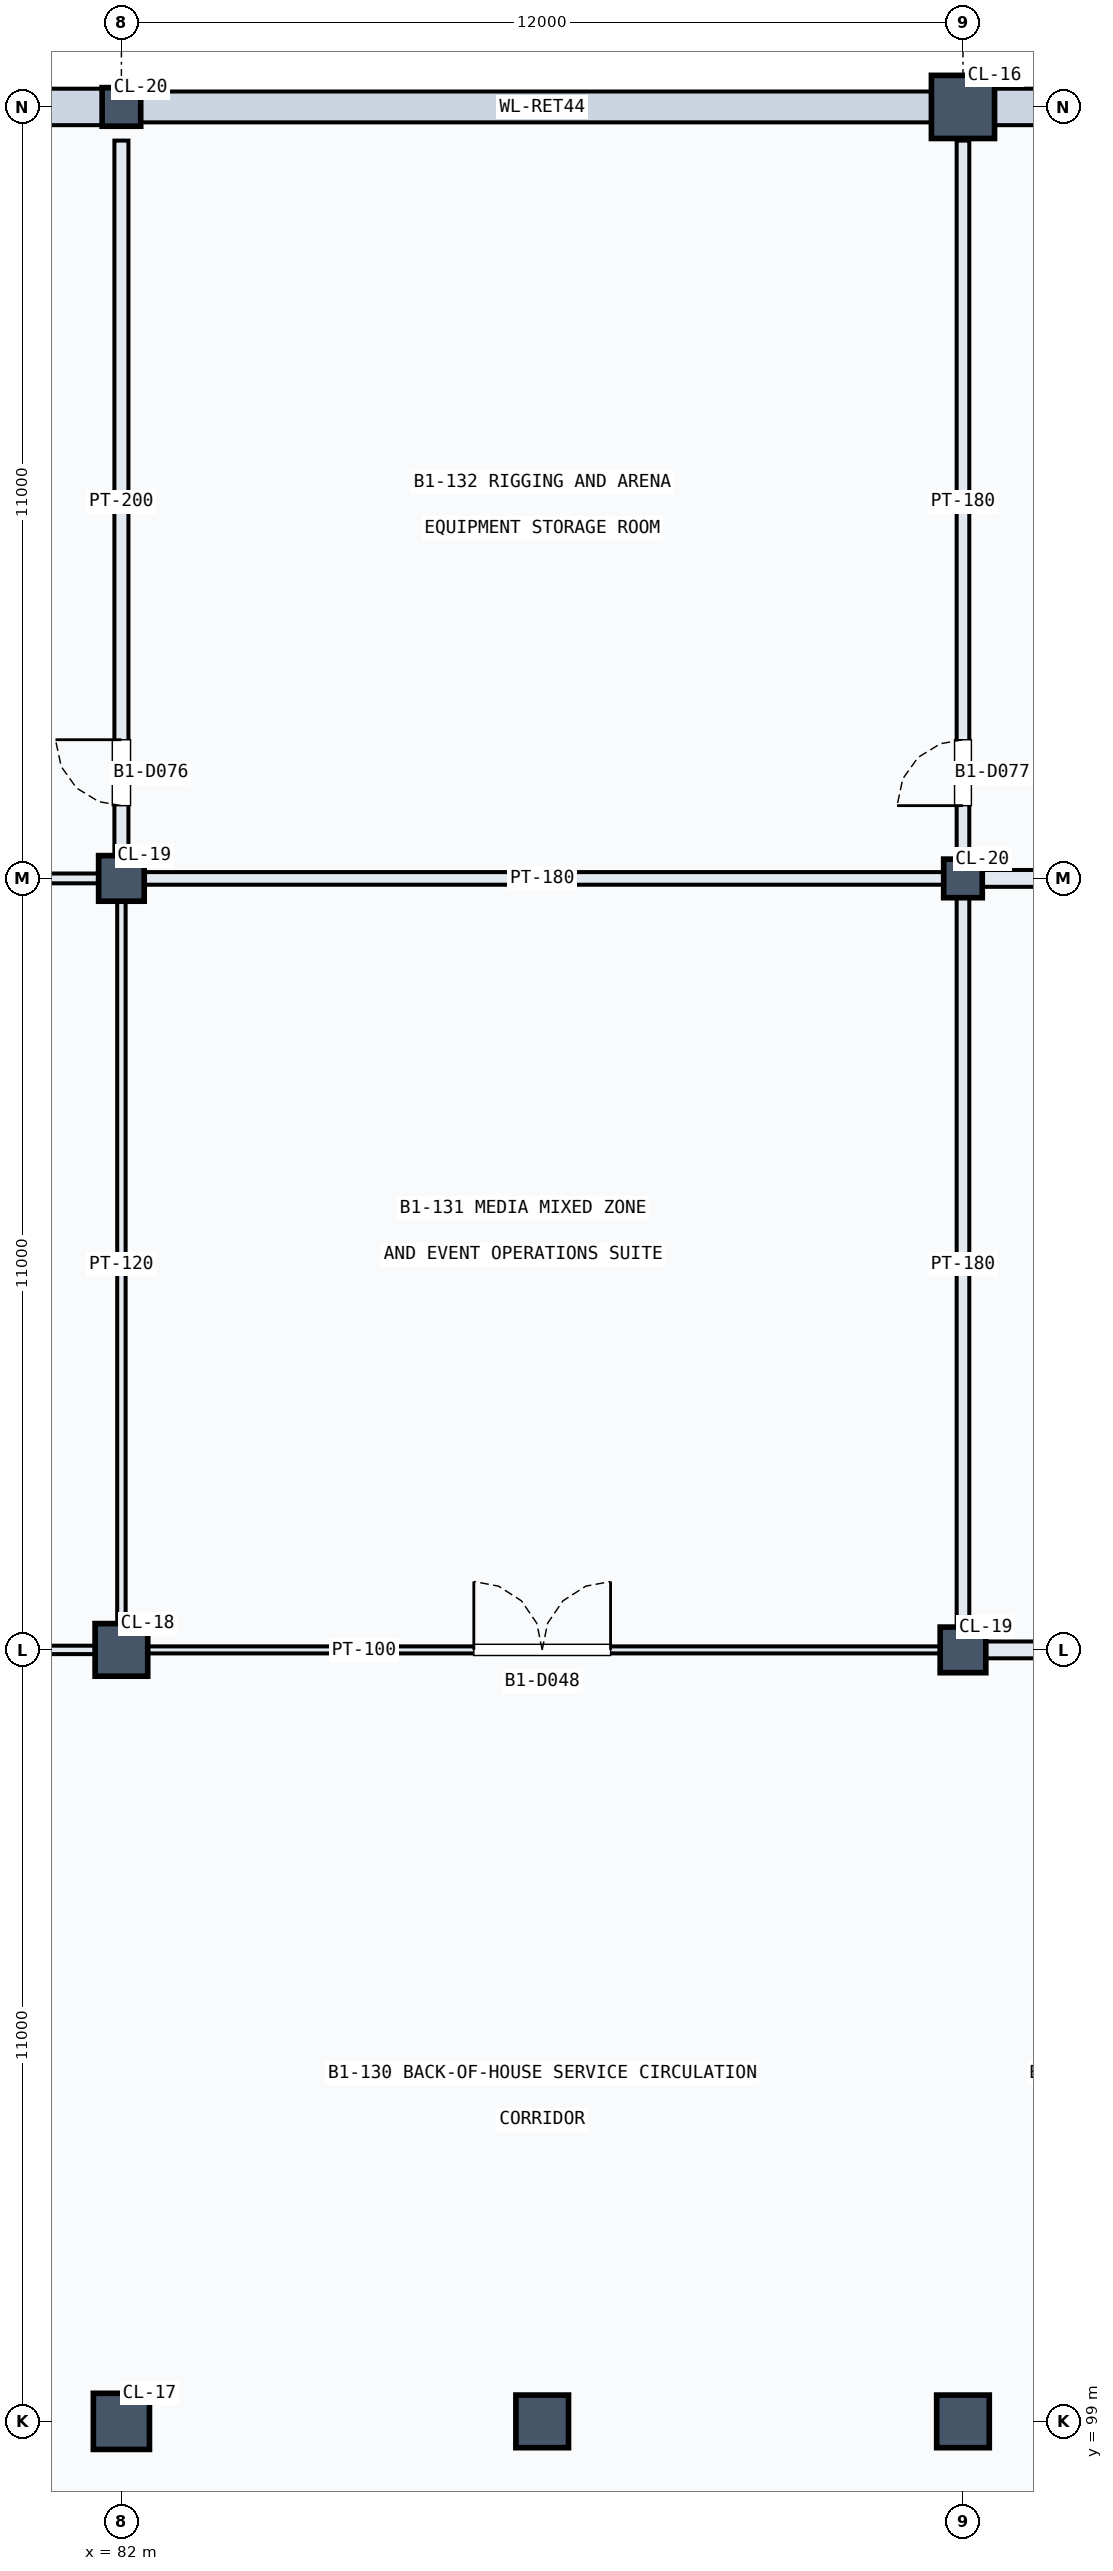
"""IFC4 building model, lengths in metres.
Left out: names, types, materials, properties, quantities, classifications, styles, units other than length and angle.
Written with IfcOpenShell. Run it as: python <this file> out.ifc"""

import sys

from ifc_helpers import new_model, si_unit, direction, frame, frame_2d, origin, origin_2d, place, context, subcontext, project, spatial, rectangle, circle, extrude, element, fill, save


model = new_model("IFC4")
c1 = context("Model", 3, precision=1e-05, world=origin(), true_north=direction((0.0, 1.0)))
c2 = subcontext(c1, "Body", "Model", "MODEL_VIEW")
j1 = project(units=[si_unit("LENGTHUNIT", "METRE"), si_unit("PLANEANGLEUNIT", "RADIAN")], contexts=[c1])
p1 = place(None, origin())
s1 = spatial("IfcSite", under=j1, at=p1, CompositionType="ELEMENT")
p2 = place(p1, origin())
s2 = spatial("IfcBuilding", under=s1, at=p2, CompositionType="ELEMENT")
p3 = place(p2, frame((0.0, 0.0, -5.4)))
s3 = spatial("IfcBuildingStorey", under=s2, at=p3, CompositionType="ELEMENT", Elevation=-5.4)
p4 = place(p3, frame((82.0, 99.0, 0.0), z_axis=(0.0, 0.0, 1.0), x_axis=(1.0, 0.0, 0.0)))
e1 = element("IfcColumn", 1, at=p4, inside=s3, PredefinedType="COLUMN", context=c2, shape_type="SweptSolid", body=[
    extrude(circle(Radius=0.4, at=origin_2d()), origin(), (0.0, 0.0, 1.0), 5.4),
])
p5 = place(p3, frame((82.0, 110.0, 0.0), z_axis=(0.0, 0.0, 1.0), x_axis=(1.0, 0.0, 0.0)))
e2 = element("IfcColumn", 2, at=p5, inside=s3, PredefinedType="COLUMN", context=c2, shape_type="SweptSolid", body=[
    extrude(circle(Radius=0.375, at=origin_2d()), origin(), (0.0, 0.0, 1.0), 5.4),
])
p6 = place(p3, frame((82.0, 121.0, 0.0), z_axis=(0.0, 0.0, 1.0), x_axis=(1.0, 0.0, 0.0)))
e3 = element("IfcColumn", 3, at=p6, inside=s3, PredefinedType="COLUMN", context=c2, shape_type="SweptSolid", body=[
    extrude(circle(Radius=0.325, at=origin_2d()), origin(), (0.0, 0.0, 1.0), 5.4),
])
p7 = place(p3, frame((82.0, 132.0, 0.0), z_axis=(0.0, 0.0, 1.0), x_axis=(1.0, 0.0, 0.0)))
e4 = element("IfcColumn", 4, at=p7, inside=s3, PredefinedType="COLUMN", context=c2, shape_type="SweptSolid", body=[
    extrude(circle(Radius=0.275, at=origin_2d()), origin(), (0.0, 0.0, 1.0), 5.4),
])
p8 = place(p3, frame((94.0, 99.0, 0.0), z_axis=(0.0, 0.0, 1.0), x_axis=(1.0, 0.0, 0.0)))
e5 = element("IfcColumn", 5, at=p8, inside=s3, PredefinedType="COLUMN", context=c2, shape_type="SweptSolid", body=[
    extrude(circle(Radius=0.375, at=origin_2d()), origin(), (0.0, 0.0, 1.0), 5.4),
])
p9 = place(p3, frame((94.0, 110.0, 0.0), z_axis=(0.0, 0.0, 1.0), x_axis=(1.0, 0.0, 0.0)))
e6 = element("IfcColumn", 6, at=p9, inside=s3, PredefinedType="COLUMN", context=c2, shape_type="SweptSolid", body=[
    extrude(circle(Radius=0.325, at=origin_2d()), origin(), (0.0, 0.0, 1.0), 5.4),
])
p10 = place(p3, frame((94.0, 121.0, 0.0), z_axis=(0.0, 0.0, 1.0), x_axis=(1.0, 0.0, 0.0)))
e7 = element("IfcColumn", 7, at=p10, inside=s3, PredefinedType="COLUMN", context=c2, shape_type="SweptSolid", body=[
    extrude(circle(Radius=0.275, at=origin_2d()), origin(), (0.0, 0.0, 1.0), 5.4),
])
p11 = place(p3, frame((94.0, 132.0, 0.0), z_axis=(0.0, 0.0, 1.0), x_axis=(1.0, 0.0, 0.0)))
e8 = element("IfcColumn", 8, at=p11, inside=s3, PredefinedType="COLUMN", context=c2, shape_type="SweptSolid", body=[
    extrude(circle(Radius=0.45, at=origin_2d()), origin(), (0.0, 0.0, 1.0), 5.4),
])
p12 = place(p3, frame((88.0, 99.0, 0.0), z_axis=(0.0, 0.0, 1.0), x_axis=(1.0, 0.0, 0.0)))
e9 = element("IfcColumn", 9, at=p12, inside=s3, PredefinedType="COLUMN", context=c2, shape_type="SweptSolid", body=[
    extrude(circle(Radius=0.375, at=origin_2d()), origin(), (0.0, 0.0, 1.0), 5.4),
])
p13 = place(p3, frame((70.22, 132.0, 0.0), z_axis=(0.0, 0.0, 1.0), x_axis=(1.0, 0.0, 0.0)))
e10 = element("IfcWall", 10, at=p13, inside=s3, PredefinedType="SOLIDWALL", context=c2, shape_type="SweptSolid", body=[
    extrude(rectangle(XDim=11.56, YDim=0.52, at=frame_2d((5.78, 0.0))), origin(), (0.0, 0.0, 1.0), 4.418),
])
p14 = place(p3, frame((82.22, 132.0, 0.0), z_axis=(0.0, 0.0, 1.0), x_axis=(1.0, 0.0, 0.0)))
e11 = element("IfcWall", 11, at=p14, inside=s3, PredefinedType="SOLIDWALL", context=c2, shape_type="SweptSolid", body=[
    extrude(rectangle(XDim=11.56, YDim=0.44, at=frame_2d((5.78, 0.0))), origin(), (0.0, 0.0, 1.0), 4.418),
])
p15 = place(p3, frame((94.22, 132.0, 0.0), z_axis=(0.0, 0.0, 1.0), x_axis=(1.0, 0.0, 0.0)))
e12 = element("IfcWall", 12, at=p15, inside=s3, PredefinedType="SOLIDWALL", context=c2, shape_type="SweptSolid", body=[
    extrude(rectangle(XDim=9.56, YDim=0.52, at=frame_2d((4.78, 0.0))), origin(), (0.0, 0.0, 1.0), 4.23),
])
p16 = place(p3, frame((70.22, 110.0, 0.0), z_axis=(0.0, 0.0, 1.0), x_axis=(1.0, 0.0, 0.0)))
e13 = element("IfcWall", 13, at=p16, inside=s3, PredefinedType="PARTITIONING", context=c2, shape_type="SweptSolid", body=[
    extrude(rectangle(XDim=11.56, YDim=0.12, at=frame_2d((5.78, 0.0))), origin(), (0.0, 0.0, 1.0), 4.08),
])
p17 = place(p16, frame((5.23, 0.0, 0.0)))
e14 = element("IfcOpeningElement", 14, at=p17, cuts=e13, PredefinedType="OPENING", context=c2, shape_type="SweptSolid", body=[
    extrude(rectangle(XDim=1.1, YDim=2.1, at=frame_2d((0.55, 1.05))), frame((0.0, 0.07, 0.0), z_axis=(0.0, -1.0, 0.0), x_axis=(1.0, 0.0, 0.0)), (0.0, 0.0, 1.0), 0.14),
])
p18 = place(p3, frame((82.22, 110.0, 0.0), z_axis=(0.0, 0.0, 1.0), x_axis=(1.0, 0.0, 0.0)))
e15 = element("IfcWall", 15, at=p18, inside=s3, PredefinedType="PARTITIONING", context=c2, shape_type="SweptSolid", body=[
    extrude(rectangle(XDim=11.56, YDim=0.1, at=frame_2d((5.78, 0.0))), origin(), (0.0, 0.0, 1.0), 4.23),
])
p19 = place(p18, frame((4.805, 0.0, 0.0)))
e16 = element("IfcOpeningElement", 16, at=p19, cuts=e15, PredefinedType="OPENING", context=c2, shape_type="SweptSolid", body=[
    extrude(rectangle(XDim=1.95, YDim=2.4, at=frame_2d((0.975, 1.2))), frame((0.0, 0.06, 0.0), z_axis=(0.0, -1.0, 0.0), x_axis=(1.0, 0.0, 0.0)), (0.0, 0.0, 1.0), 0.12),
])
p20 = place(p3, frame((94.22, 110.0, 0.0), z_axis=(0.0, 0.0, 1.0), x_axis=(1.0, 0.0, 0.0)))
e17 = element("IfcWall", 17, at=p20, inside=s3, PredefinedType="PARTITIONING", context=c2, shape_type="SweptSolid", body=[
    extrude(rectangle(XDim=9.56, YDim=0.24, at=frame_2d((4.78, 0.0))), origin(), (0.0, 0.0, 1.0), 4.08),
])
p21 = place(p20, frame((4.07, 0.0, 0.0)))
e18 = element("IfcOpeningElement", 18, at=p21, cuts=e17, PredefinedType="OPENING", context=c2, shape_type="SweptSolid", body=[
    extrude(rectangle(XDim=1.42, YDim=2.25, at=frame_2d((0.71, 1.125))), frame((0.0, 0.13, 0.0), z_axis=(0.0, -1.0, 0.0), x_axis=(1.0, 0.0, 0.0)), (0.0, 0.0, 1.0), 0.26),
])
p22 = place(p3, frame((70.22, 121.0, 0.0), z_axis=(0.0, 0.0, 1.0), x_axis=(1.0, 0.0, 0.0)))
e19 = element("IfcWall", 19, at=p22, inside=s3, PredefinedType="PARTITIONING", context=c2, shape_type="SweptSolid", body=[
    extrude(rectangle(XDim=11.56, YDim=0.14, at=frame_2d((5.78, 0.0))), origin(), (0.0, 0.0, 1.0), 4.28),
])
p23 = place(p3, frame((82.0, 110.22, 0.0), z_axis=(0.0, 0.0, 1.0), x_axis=(0.0, 1.0, 0.0)))
e20 = element("IfcWall", 20, at=p23, inside=s3, PredefinedType="PARTITIONING", context=c2, shape_type="SweptSolid", body=[
    extrude(rectangle(XDim=10.56, YDim=0.12, at=frame_2d((5.28, 0.0))), origin(), (0.0, 0.0, 1.0), 4.23),
])
p24 = place(p3, frame((82.0, 121.22, 0.0), z_axis=(0.0, 0.0, 1.0), x_axis=(0.0, 1.0, 0.0)))
e21 = element("IfcWall", 21, at=p24, inside=s3, PredefinedType="PARTITIONING", context=c2, shape_type="SweptSolid", body=[
    extrude(rectangle(XDim=10.3, YDim=0.2, at=frame_2d((5.15, 0.0))), origin(), (0.0, 0.0, 1.0), 4.33),
])
p25 = place(p24, frame((0.817, 0.0, 0.0)))
e22 = element("IfcOpeningElement", 22, at=p25, cuts=e21, PredefinedType="OPENING", context=c2, shape_type="SweptSolid", body=[
    extrude(rectangle(XDim=0.94, YDim=2.15, at=frame_2d((0.47, 1.075))), frame((0.0, 0.11, 0.0), z_axis=(0.0, -1.0, 0.0), x_axis=(1.0, 0.0, 0.0)), (0.0, 0.0, 1.0), 0.22),
])
p26 = place(p3, frame((82.22, 121.0, 0.0), z_axis=(0.0, 0.0, 1.0), x_axis=(1.0, 0.0, 0.0)))
e23 = element("IfcWall", 23, at=p26, inside=s3, PredefinedType="PARTITIONING", context=c2, shape_type="SweptSolid", body=[
    extrude(rectangle(XDim=11.56, YDim=0.18, at=frame_2d((5.78, 0.0))), origin(), (0.0, 0.0, 1.0), 4.33),
])
p27 = place(p3, frame((94.0, 110.22, 0.0), z_axis=(0.0, 0.0, 1.0), x_axis=(0.0, 1.0, 0.0)))
e24 = element("IfcWall", 24, at=p27, inside=s3, PredefinedType="PARTITIONING", context=c2, shape_type="SweptSolid", body=[
    extrude(rectangle(XDim=10.56, YDim=0.18, at=frame_2d((5.28, 0.0))), origin(), (0.0, 0.0, 1.0), 4.28),
])
p28 = place(p3, frame((94.0, 121.22, 0.0), z_axis=(0.0, 0.0, 1.0), x_axis=(0.0, 1.0, 0.0)))
e25 = element("IfcWall", 25, at=p28, inside=s3, PredefinedType="PARTITIONING", context=c2, shape_type="SweptSolid", body=[
    extrude(rectangle(XDim=10.3, YDim=0.18, at=frame_2d((5.15, 0.0))), origin(), (0.0, 0.0, 1.0), 4.346),
])
p29 = place(p28, frame((0.817, 0.0, 0.0)))
e26 = element("IfcOpeningElement", 26, at=p29, cuts=e25, PredefinedType="OPENING", context=c2, shape_type="SweptSolid", body=[
    extrude(rectangle(XDim=0.94, YDim=2.15, at=frame_2d((0.47, 1.075))), frame((0.0, 0.1, 0.0), z_axis=(0.0, -1.0, 0.0), x_axis=(1.0, 0.0, 0.0)), (0.0, 0.0, 1.0), 0.2),
])
p30 = place(p3, frame((94.22, 121.0, 0.0), z_axis=(0.0, 0.0, 1.0), x_axis=(1.0, 0.0, 0.0)))
e27 = element("IfcWall", 27, at=p30, inside=s3, PredefinedType="PARTITIONING", context=c2, shape_type="SweptSolid", body=[
    extrude(rectangle(XDim=9.56, YDim=0.24, at=frame_2d((4.78, 0.0))), origin(), (0.0, 0.0, 1.0), 4.08),
])
p31 = place(p19, origin())
e28 = element("IfcDoor", 28, at=p31, inside=s3, OperationType="DOUBLE_DOOR_SINGLE_SWING", PredefinedType="DOOR", context=c2, shape_type="SweptSolid", body=[
    extrude(rectangle(XDim=1.95, YDim=2.4, at=frame_2d((0.975, 1.2))), frame((0.0, 0.025, 0.0), z_axis=(0.0, -1.0, 0.0), x_axis=(1.0, 0.0, 0.0)), (0.0, 0.0, 1.0), 0.05),
])
fill(e16, e28)
p32 = place(p25, origin())
e29 = element("IfcDoor", 29, at=p32, inside=s3, OperationType="SINGLE_SWING_RIGHT", PredefinedType="DOOR", context=c2, shape_type="SweptSolid", body=[
    extrude(rectangle(XDim=0.94, YDim=2.15, at=frame_2d((0.47, 1.075))), frame((0.0, 0.025, 0.0), z_axis=(0.0, -1.0, 0.0), x_axis=(1.0, 0.0, 0.0)), (0.0, 0.0, 1.0), 0.05),
])
fill(e22, e29)
p33 = place(p29, origin())
e30 = element("IfcDoor", 30, at=p33, inside=s3, OperationType="SINGLE_SWING_LEFT", PredefinedType="DOOR", context=c2, shape_type="SweptSolid", body=[
    extrude(rectangle(XDim=0.94, YDim=2.15, at=frame_2d((0.47, 1.075))), frame((0.0, 0.025, 0.0), z_axis=(0.0, -1.0, 0.0), x_axis=(1.0, 0.0, 0.0)), (0.0, 0.0, 1.0), 0.05),
])
fill(e26, e30)
save(model, sys.argv[1])
